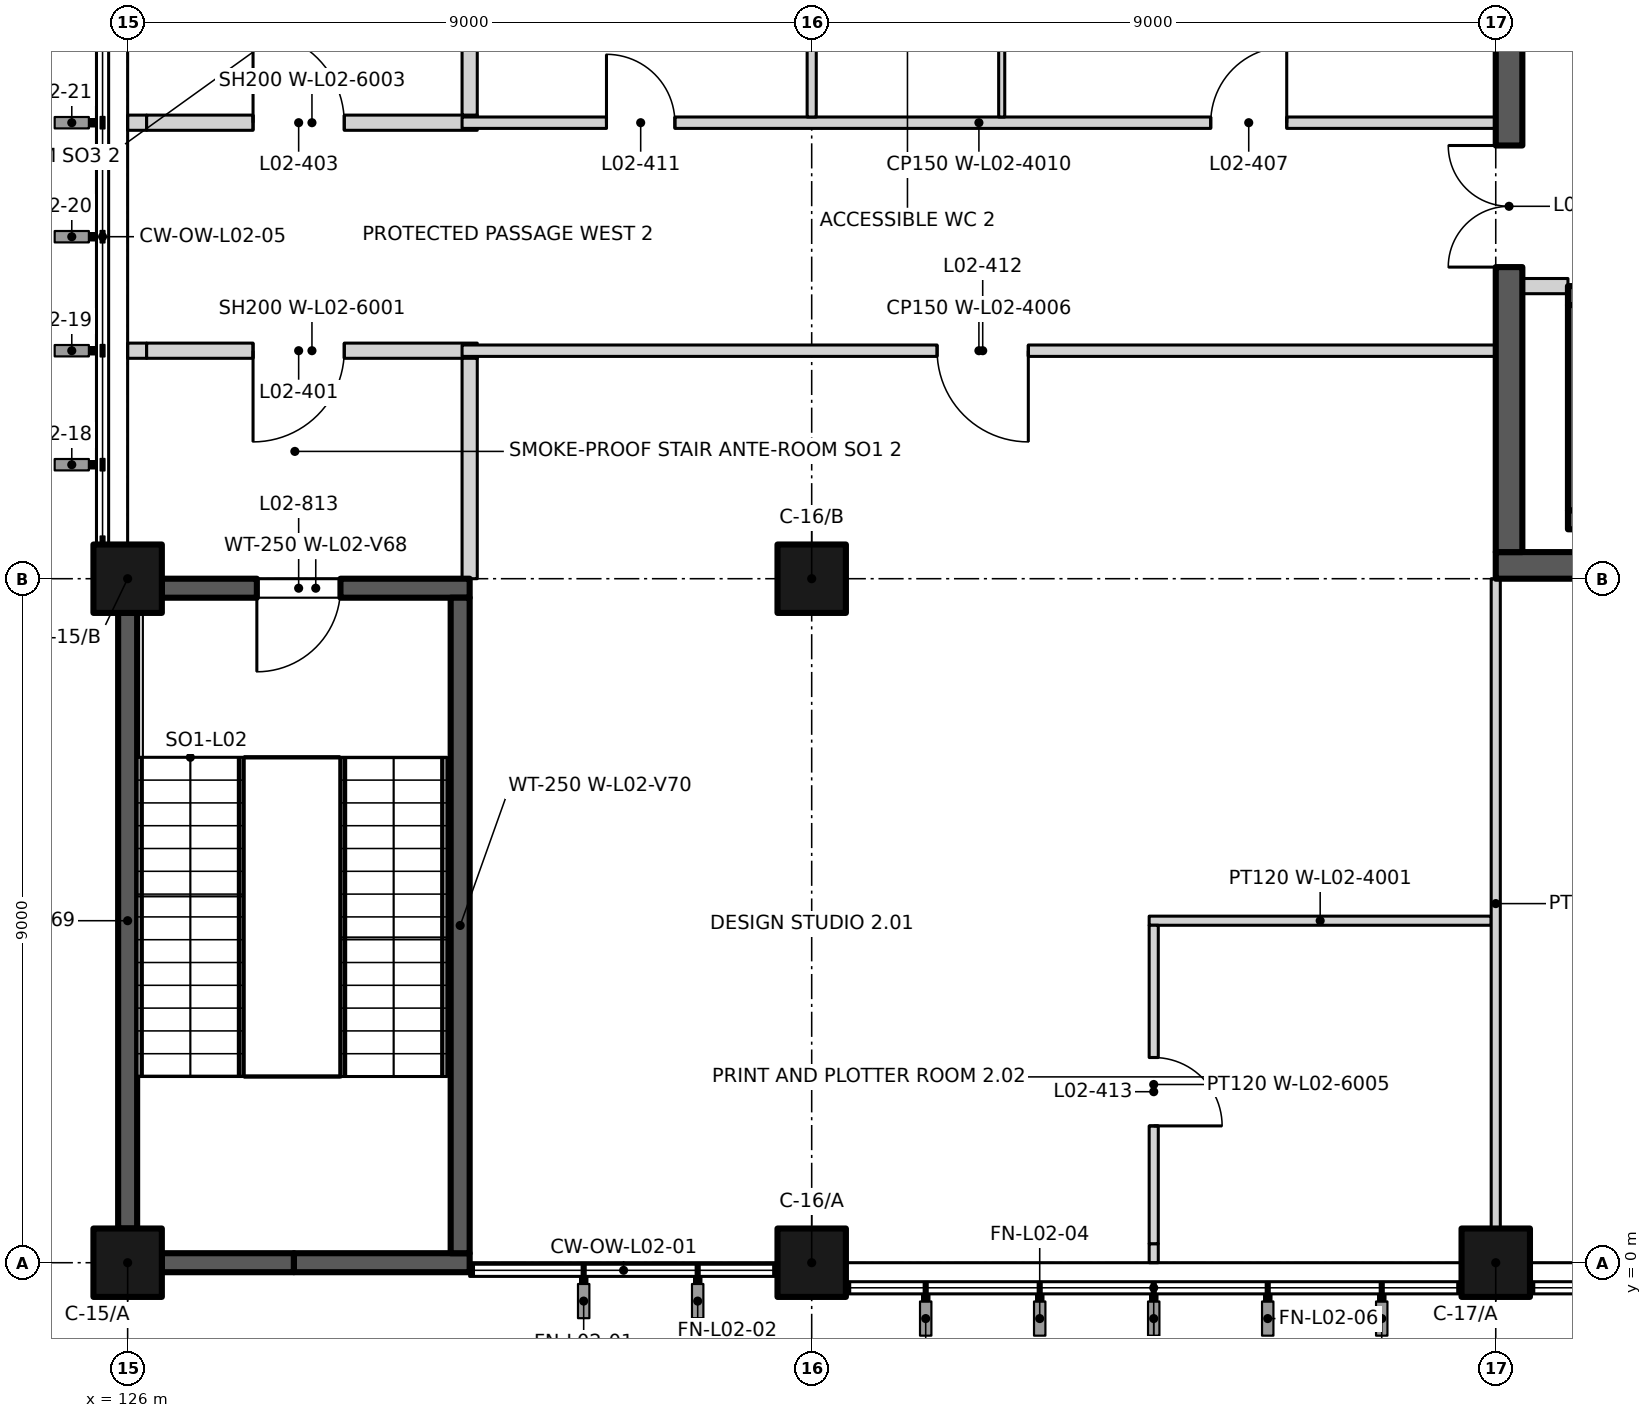
"""IFC4 building model, lengths in metres.
Left out: names, types, materials, properties, quantities, classifications, styles, units other than length and angle.
Written with IfcOpenShell. Run it as: python <this file> out.ifc"""

import sys

from ifc_helpers import new_model, si_unit, direction, frame, frame_2d, origin, origin_2d, place, context, subcontext, project, spatial, rectangle, extrude, element, fill, save


model = new_model("IFC4")
c1 = context("Model", 3, precision=1e-05, world=origin(), true_north=direction((0.0, 1.0)))
c2 = subcontext(c1, "Body", "Model", "MODEL_VIEW")
j1 = project(units=[si_unit("LENGTHUNIT", "METRE"), si_unit("PLANEANGLEUNIT", "RADIAN")], contexts=[c1])
p1 = place(None, origin())
s1 = spatial("IfcSite", under=j1, at=p1, CompositionType="ELEMENT")
p2 = place(p1, origin())
s2 = spatial("IfcBuilding", under=s1, at=p2, CompositionType="ELEMENT")
p3 = place(p2, frame((0.0, 0.0, 10.5)))
s3 = spatial("IfcBuildingStorey", under=s2, at=p3, CompositionType="ELEMENT", Elevation=10.5)
for number, where, z_axis, x_axis in (
    (1, (126.0, 0.0, 0.0), (0.0, 0.0, 1.0), (1.0, 0.0, 0.0)),
    (2, (135.0, 0.0, 0.0), (0.0, 0.0, 1.0), (1.0, 0.0, 0.0)),
    (3, (144.0, 0.0, 0.0), (0.0, 0.0, 1.0), (1.0, 0.0, 0.0)),
    (4, (126.0, 9.0, 0.0), (0.0, 0.0, 1.0), (1.0, 0.0, 0.0)),
    (5, (135.0, 9.0, 0.0), (0.0, 0.0, 1.0), (1.0, 0.0, 0.0)),
):
    element("IfcColumn", number, at=place(p3, frame(where, z_axis=z_axis, x_axis=x_axis)), inside=s3, PredefinedType="COLUMN", context=c2, shape_type="SweptSolid", body=[
        extrude(rectangle(XDim=0.9, YDim=0.9, at=origin_2d()), origin(), (0.0, 0.0, 1.0), 4.5),
    ])
p4 = place(p3, frame((126.45, 0.0, 0.0), z_axis=(0.0, 0.0, 1.0), x_axis=(1.0, 0.0, 0.0)))
e6 = element("IfcWall", 6, at=p4, inside=s3, PredefinedType="SHEAR", context=c2, shape_type="SweptSolid", body=[
    extrude(rectangle(XDim=1.738, YDim=0.25, at=frame_2d((0.869, 0.0))), origin(), (0.0, 0.0, 1.0), 4.5),
])
p5 = place(p3, frame((128.188, 0.0, 0.0), z_axis=(0.0, 0.0, 1.0), x_axis=(1.0, 0.0, 0.0)))
e7 = element("IfcWall", 7, at=p5, inside=s3, PredefinedType="SHEAR", context=c2, shape_type="SweptSolid", body=[
    extrude(rectangle(XDim=2.312, YDim=0.25, at=frame_2d((1.156, 0.0))), origin(), (0.0, 0.0, 1.0), 4.5),
])
p6 = place(p3, frame((126.45, 8.875, 0.0), z_axis=(0.0, 0.0, 1.0), x_axis=(1.0, 0.0, 0.0)))
e8 = element("IfcWall", 8, at=p6, inside=s3, PredefinedType="SHEAR", context=c2, shape_type="SweptSolid", body=[
    extrude(rectangle(XDim=4.05, YDim=0.25, at=frame_2d((2.025, 0.0))), origin(), (0.0, 0.0, 1.0), 4.5),
])
p7 = place(p6, frame((2.35, 0.0, 0.0), z_axis=(0.0, 0.0, 1.0), x_axis=(-1.0, 0.0, 0.0)))
e9 = element("IfcOpeningElement", 9, at=p7, cuts=e8, PredefinedType="OPENING", context=c2, shape_type="SweptSolid", body=[
    extrude(rectangle(XDim=1.1, YDim=2.1, at=frame_2d((0.55, 1.05))), frame((0.0, 0.135, 0.0), z_axis=(0.0, -1.0, 0.0), x_axis=(1.0, 0.0, 0.0)), (0.0, 0.0, 1.0), 0.27),
])
p8 = place(p3, frame((126.0, 0.45, 0.0), z_axis=(0.0, 0.0, 1.0), x_axis=(0.0, 1.0, 0.0)))
e10 = element("IfcWall", 10, at=p8, inside=s3, PredefinedType="SHEAR", context=c2, shape_type="SweptSolid", body=[
    extrude(rectangle(XDim=8.1, YDim=0.25, at=frame_2d((4.05, 0.0))), origin(), (0.0, 0.0, 1.0), 4.5),
])
p9 = place(p3, frame((130.375, 0.125, 0.0), z_axis=(0.0, 0.0, 1.0), x_axis=(0.0, 1.0, 0.0)))
e11 = element("IfcWall", 11, at=p9, inside=s3, PredefinedType="SHEAR", context=c2, shape_type="SweptSolid", body=[
    extrude(rectangle(XDim=8.625, YDim=0.25, at=frame_2d((4.312, 0.0))), origin(), (0.0, 0.0, 1.0), 4.5),
])
p10 = place(p3, frame((144.95, 12.725, 0.0), z_axis=(0.0, 0.0, 1.0), x_axis=(1.0, 0.0, 0.0)))
e12 = element("IfcWall", 12, at=p10, inside=s3, PredefinedType="SHEAR", context=c2, shape_type="SweptSolid", body=[
    extrude(rectangle(XDim=12.05, YDim=0.25, at=frame_2d((6.025, 0.0))), origin(), (0.0, 0.0, 1.0), 4.5),
])
p11 = place(p10, frame((1.05, 0.0, 0.0)))
e13 = element("IfcOpeningElement", 13, at=p11, cuts=e12, PredefinedType="OPENING", context=c2, shape_type="SweptSolid", body=[
    extrude(rectangle(XDim=1.1, YDim=2.1, at=frame_2d((0.55, 1.05))), frame((0.0, 0.135, 0.0), z_axis=(0.0, -1.0, 0.0), x_axis=(1.0, 0.0, 0.0)), (0.0, 0.0, 1.0), 0.27),
])
p12 = place(p10, frame((4.0, 0.0, 0.0)))
e14 = element("IfcOpeningElement", 14, at=p12, cuts=e12, PredefinedType="OPENING", context=c2, shape_type="SweptSolid", body=[
    extrude(rectangle(XDim=1.1, YDim=2.1, at=frame_2d((0.55, 1.05))), frame((0.0, 0.135, 0.0), z_axis=(0.0, -1.0, 0.0), x_axis=(1.0, 0.0, 0.0)), (0.0, 0.0, 1.0), 0.27),
])
p13 = place(p10, frame((6.95, 0.0, 0.0)))
e15 = element("IfcOpeningElement", 15, at=p13, cuts=e12, PredefinedType="OPENING", context=c2, shape_type="SweptSolid", body=[
    extrude(rectangle(XDim=1.1, YDim=2.1, at=frame_2d((0.55, 1.05))), frame((0.0, 0.135, 0.0), z_axis=(0.0, -1.0, 0.0), x_axis=(1.0, 0.0, 0.0)), (0.0, 0.0, 1.0), 0.27),
])
p14 = place(p10, frame((9.9, 0.0, 0.0)))
e16 = element("IfcOpeningElement", 16, at=p14, cuts=e12, PredefinedType="OPENING", context=c2, shape_type="SweptSolid", body=[
    extrude(rectangle(XDim=1.1, YDim=2.1, at=frame_2d((0.55, 1.05))), frame((0.0, 0.135, 0.0), z_axis=(0.0, -1.0, 0.0), x_axis=(1.0, 0.0, 0.0)), (0.0, 0.0, 1.0), 0.27),
])
p15 = place(p3, frame((144.95, 9.775, 0.0), z_axis=(0.0, 0.0, 1.0), x_axis=(1.0, 0.0, 0.0)))
e17 = element("IfcWall", 17, at=p15, inside=s3, PredefinedType="SHEAR", context=c2, shape_type="SweptSolid", body=[
    extrude(rectangle(XDim=12.05, YDim=0.25, at=frame_2d((6.025, 0.0))), origin(), (0.0, 0.0, 1.0), 4.5),
])
p16 = place(p3, frame((145.075, 9.9, 0.0), z_axis=(0.0, 0.0, 1.0), x_axis=(0.0, 1.0, 0.0)))
e18 = element("IfcWall", 18, at=p16, inside=s3, PredefinedType="SHEAR", context=c2, shape_type="SweptSolid", body=[
    extrude(rectangle(XDim=2.7, YDim=0.25, at=frame_2d((1.35, 0.0))), origin(), (0.0, 0.0, 1.0), 4.5),
])
p17 = place(p3, frame((139.44, 4.5, 0.0), z_axis=(0.0, 0.0, 1.0), x_axis=(1.0, 0.0, 0.0)))
e19 = element("IfcWall", 19, at=p17, inside=s3, PredefinedType="PARTITIONING", context=c2, shape_type="SweptSolid", body=[
    extrude(rectangle(XDim=4.5, YDim=0.12, at=frame_2d((2.25, 0.0))), origin(), (0.0, 0.0, 1.0), 4.2),
])
p18 = place(p3, frame((144.0, 9.175, 0.0), z_axis=(0.0, 0.0, 1.0), x_axis=(1.0, 0.0, 0.0)))
e20 = element("IfcWall", 20, at=p18, inside=s3, PredefinedType="SHEAR", context=c2, shape_type="SweptSolid", body=[
    extrude(rectangle(XDim=18.0, YDim=0.35, at=frame_2d((9.0, 0.0))), origin(), (0.0, 0.0, 1.0), 4.2),
])
p19 = place(p18, frame((16.463, 0.0, 0.0), z_axis=(0.0, 0.0, 1.0), x_axis=(-1.0, 0.0, 0.0)))
e21 = element("IfcOpeningElement", 21, at=p19, cuts=e20, PredefinedType="OPENING", context=c2, shape_type="SweptSolid", body=[
    extrude(rectangle(XDim=2.1, YDim=2.4, at=frame_2d((1.05, 1.2))), frame((0.0, 0.185, 0.0), z_axis=(0.0, -1.0, 0.0), x_axis=(1.0, 0.0, 0.0)), (0.0, 0.0, 1.0), 0.37),
])
p20 = place(p3, frame((126.0, 12.0, 0.0), z_axis=(0.0, 0.0, 1.0), x_axis=(1.0, 0.0, 0.0)))
e22 = element("IfcWall", 22, at=p20, inside=s3, PredefinedType="PARTITIONING", context=c2, shape_type="SweptSolid", body=[
    extrude(rectangle(XDim=0.25, YDim=0.2, at=frame_2d((0.125, 0.0))), origin(), (0.0, 0.0, 1.0), 3.6),
])
p21 = place(p3, frame((126.25, 12.0, 0.0), z_axis=(0.0, 0.0, 1.0), x_axis=(1.0, 0.0, 0.0)))
e23 = element("IfcWall", 23, at=p21, inside=s3, PredefinedType="PARTITIONING", context=c2, shape_type="SweptSolid", body=[
    extrude(rectangle(XDim=4.35, YDim=0.2, at=frame_2d((2.175, 0.0))), origin(), (0.0, 0.0, 1.0), 4.2),
])
p22 = place(p21, frame((2.6, 0.0, 0.0), z_axis=(0.0, 0.0, 1.0), x_axis=(-1.0, 0.0, 0.0)))
e24 = element("IfcOpeningElement", 24, at=p22, cuts=e23, PredefinedType="OPENING", context=c2, shape_type="SweptSolid", body=[
    extrude(rectangle(XDim=1.2, YDim=2.1, at=frame_2d((0.6, 1.05))), frame((0.0, 0.11, 0.0), z_axis=(0.0, -1.0, 0.0), x_axis=(1.0, 0.0, 0.0)), (0.0, 0.0, 1.0), 0.22),
])
p23 = place(p3, frame((130.4, 12.0, 0.0), z_axis=(0.0, 0.0, 1.0), x_axis=(1.0, 0.0, 0.0)))
e25 = element("IfcWall", 25, at=p23, inside=s3, PredefinedType="PARTITIONING", context=c2, shape_type="SweptSolid", body=[
    extrude(rectangle(XDim=13.6, YDim=0.15, at=frame_2d((6.8, 0.0))), origin(), (0.0, 0.0, 1.0), 4.2),
])
p24 = place(p23, frame((7.45, 0.0, 0.0), z_axis=(0.0, 0.0, 1.0), x_axis=(-1.0, 0.0, 0.0)))
e26 = element("IfcOpeningElement", 26, at=p24, cuts=e25, PredefinedType="OPENING", context=c2, shape_type="SweptSolid", body=[
    extrude(rectangle(XDim=1.2, YDim=2.1, at=frame_2d((0.6, 1.05))), frame((0.0, 0.085, 0.0), z_axis=(0.0, -1.0, 0.0), x_axis=(1.0, 0.0, 0.0)), (0.0, 0.0, 1.0), 0.17),
])
p25 = place(p3, frame((144.35, 12.85, 0.0), z_axis=(0.0, 0.0, 1.0), x_axis=(1.0, 0.0, 0.0)))
e27 = element("IfcWall", 27, at=p25, inside=s3, PredefinedType="PARTITIONING", context=c2, shape_type="SweptSolid", body=[
    extrude(rectangle(XDim=0.6, YDim=0.2, at=frame_2d((0.3, 0.0))), origin(), (0.0, 0.0, 1.0), 4.2),
])
p26 = place(p3, frame((126.0, 15.0, 0.0), z_axis=(0.0, 0.0, 1.0), x_axis=(1.0, 0.0, 0.0)))
e28 = element("IfcWall", 28, at=p26, inside=s3, PredefinedType="PARTITIONING", context=c2, shape_type="SweptSolid", body=[
    extrude(rectangle(XDim=0.25, YDim=0.2, at=frame_2d((0.125, 0.0))), origin(), (0.0, 0.0, 1.0), 3.6),
])
p27 = place(p3, frame((126.25, 15.0, 0.0), z_axis=(0.0, 0.0, 1.0), x_axis=(1.0, 0.0, 0.0)))
e29 = element("IfcWall", 29, at=p27, inside=s3, PredefinedType="PARTITIONING", context=c2, shape_type="SweptSolid", body=[
    extrude(rectangle(XDim=4.35, YDim=0.2, at=frame_2d((2.175, 0.0))), origin(), (0.0, 0.0, 1.0), 4.2),
])
p28 = place(p27, frame((1.4, 0.0, 0.0)))
e30 = element("IfcOpeningElement", 30, at=p28, cuts=e29, PredefinedType="OPENING", context=c2, shape_type="SweptSolid", body=[
    extrude(rectangle(XDim=1.2, YDim=2.1, at=frame_2d((0.6, 1.05))), frame((0.0, 0.11, 0.0), z_axis=(0.0, -1.0, 0.0), x_axis=(1.0, 0.0, 0.0)), (0.0, 0.0, 1.0), 0.22),
])
p29 = place(p3, frame((130.4, 15.0, 0.0), z_axis=(0.0, 0.0, 1.0), x_axis=(1.0, 0.0, 0.0)))
e31 = element("IfcWall", 31, at=p29, inside=s3, PredefinedType="PARTITIONING", context=c2, shape_type="SweptSolid", body=[
    extrude(rectangle(XDim=13.6, YDim=0.15, at=frame_2d((6.8, 0.0))), origin(), (0.0, 0.0, 1.0), 4.2),
])
p30 = place(p29, frame((9.85, 0.0, 0.0)))
e32 = element("IfcOpeningElement", 32, at=p30, cuts=e31, PredefinedType="OPENING", context=c2, shape_type="SweptSolid", body=[
    extrude(rectangle(XDim=1.0, YDim=2.1, at=frame_2d((0.5, 1.05))), frame((0.0, 0.085, 0.0), z_axis=(0.0, -1.0, 0.0), x_axis=(1.0, 0.0, 0.0)), (0.0, 0.0, 1.0), 0.17),
])
p31 = place(p29, frame((1.9, 0.0, 0.0)))
e33 = element("IfcOpeningElement", 33, at=p31, cuts=e31, PredefinedType="OPENING", context=c2, shape_type="SweptSolid", body=[
    extrude(rectangle(XDim=0.9, YDim=2.1, at=frame_2d((0.45, 1.05))), frame((0.0, 0.085, 0.0), z_axis=(0.0, -1.0, 0.0), x_axis=(1.0, 0.0, 0.0)), (0.0, 0.0, 1.0), 0.17),
])
for number, where, z_axis, x_axis in (
    (34, (130.5, 9.0, 0.0), (0.0, 0.0, 1.0), (0.0, 1.0, 0.0)),
    (35, (130.5, 15.1, 0.0), (0.0, 0.0, 1.0), (0.0, 1.0, 0.0)),
):
    element("IfcWall", number, at=place(p3, frame(where, z_axis=z_axis, x_axis=x_axis)), inside=s3, PredefinedType="PARTITIONING", context=c2, shape_type="SweptSolid", body=[
        extrude(rectangle(XDim=2.9, YDim=0.2, at=frame_2d((1.45, 0.0))), origin(), (0.0, 0.0, 1.0), 4.2),
    ])
p32 = place(p3, frame((135.0, 15.075, 0.0), z_axis=(0.0, 0.0, 1.0), x_axis=(0.0, 1.0, 0.0)))
e36 = element("IfcWall", 36, at=p32, inside=s3, PredefinedType="PARTITIONING", context=c2, shape_type="SweptSolid", body=[
    extrude(rectangle(XDim=2.475, YDim=0.12, at=frame_2d((1.238, 0.0))), origin(), (0.0, 0.0, 1.0), 4.2),
])
p33 = place(p3, frame((137.5, 15.075, 0.0), z_axis=(0.0, 0.0, 1.0), x_axis=(0.0, 1.0, 0.0)))
e37 = element("IfcWall", 37, at=p33, inside=s3, PredefinedType="PARTITIONING", context=c2, shape_type="SweptSolid", body=[
    extrude(rectangle(XDim=4.385, YDim=0.08, at=frame_2d((2.192, 0.0))), origin(), (0.0, 0.0, 1.0), 4.2),
])
p34 = place(p33, frame((1.675, 0.0, 0.0)))
e38 = element("IfcOpeningElement", 38, at=p34, cuts=e37, PredefinedType="OPENING", context=c2, shape_type="SweptSolid", body=[
    extrude(rectangle(XDim=1.0, YDim=2.1, at=frame_2d((0.5, 1.05))), frame((0.0, 0.05, 0.0), z_axis=(0.0, -1.0, 0.0), x_axis=(1.0, 0.0, 0.0)), (0.0, 0.0, 1.0), 0.1),
])
p35 = place(p3, frame((139.5, 0.0, 0.0), z_axis=(0.0, 0.0, 1.0), x_axis=(0.0, 1.0, 0.0)))
e39 = element("IfcWall", 39, at=p35, inside=s3, PredefinedType="PARTITIONING", context=c2, shape_type="SweptSolid", body=[
    extrude(rectangle(XDim=0.25, YDim=0.12, at=frame_2d((0.125, 0.0))), origin(), (0.0, 0.0, 1.0), 3.6),
])
p36 = place(p3, frame((139.5, 0.25, 0.0), z_axis=(0.0, 0.0, 1.0), x_axis=(0.0, 1.0, 0.0)))
e40 = element("IfcWall", 40, at=p36, inside=s3, PredefinedType="PARTITIONING", context=c2, shape_type="SweptSolid", body=[
    extrude(rectangle(XDim=4.19, YDim=0.12, at=frame_2d((2.095, 0.0))), origin(), (0.0, 0.0, 1.0), 4.2),
])
p37 = place(p36, frame((2.45, 0.0, 0.0), z_axis=(0.0, 0.0, 1.0), x_axis=(-1.0, 0.0, 0.0)))
e41 = element("IfcOpeningElement", 41, at=p37, cuts=e40, PredefinedType="OPENING", context=c2, shape_type="SweptSolid", body=[
    extrude(rectangle(XDim=0.9, YDim=2.1, at=frame_2d((0.45, 1.05))), frame((0.0, 0.07, 0.0), z_axis=(0.0, -1.0, 0.0), x_axis=(1.0, 0.0, 0.0)), (0.0, 0.0, 1.0), 0.14),
])
p38 = place(p3, frame((144.0, 0.45, 0.0), z_axis=(0.0, 0.0, 1.0), x_axis=(0.0, 1.0, 0.0)))
e42 = element("IfcWall", 42, at=p38, inside=s3, PredefinedType="PARTITIONING", context=c2, shape_type="SweptSolid", body=[
    extrude(rectangle(XDim=8.55, YDim=0.12, at=frame_2d((4.275, 0.0))), origin(), (0.0, 0.0, 1.0), 4.2),
])
p39 = place(p3, frame((144.175, 9.35, 0.0), z_axis=(0.0, 0.0, 1.0), x_axis=(0.0, 1.0, 0.0)))
e43 = element("IfcWall", 43, at=p39, inside=s3, PredefinedType="SHEAR", context=c2, shape_type="SweptSolid", body=[
    extrude(rectangle(XDim=17.4, YDim=0.35, at=frame_2d((8.7, 0.0))), origin(), (0.0, 0.0, 1.0), 4.2),
])
p40 = place(p39, frame((3.75, 0.0, 0.0)))
e44 = element("IfcOpeningElement", 44, at=p40, cuts=e43, PredefinedType="OPENING", context=c2, shape_type="SweptSolid", body=[
    extrude(rectangle(XDim=1.6, YDim=2.4, at=frame_2d((0.8, 1.2))), frame((0.0, 0.185, 0.0), z_axis=(0.0, -1.0, 0.0), x_axis=(1.0, 0.0, 0.0)), (0.0, 0.0, 1.0), 0.37),
])
p41 = place(p7, origin())
e45 = element("IfcDoor", 45, at=p41, inside=s3, OperationType="SINGLE_SWING_RIGHT", PredefinedType="DOOR", context=c2, shape_type="SweptSolid", body=[
    extrude(rectangle(XDim=1.1, YDim=2.1, at=frame_2d((0.55, 1.05))), frame((0.0, 0.025, 0.0), z_axis=(0.0, -1.0, 0.0), x_axis=(1.0, 0.0, 0.0)), (0.0, 0.0, 1.0), 0.05),
])
fill(e9, e45)
p42 = place(p22, origin())
e46 = element("IfcDoor", 46, at=p42, inside=s3, OperationType="SINGLE_SWING_RIGHT", PredefinedType="DOOR", context=c2, shape_type="SweptSolid", body=[
    extrude(rectangle(XDim=1.2, YDim=2.1, at=frame_2d((0.6, 1.05))), frame((0.0, 0.025, 0.0), z_axis=(0.0, -1.0, 0.0), x_axis=(1.0, 0.0, 0.0)), (0.0, 0.0, 1.0), 0.05),
])
fill(e24, e46)
p43 = place(p28, origin())
e47 = element("IfcDoor", 47, at=p43, inside=s3, OperationType="SINGLE_SWING_LEFT", PredefinedType="DOOR", context=c2, shape_type="SweptSolid", body=[
    extrude(rectangle(XDim=1.2, YDim=2.1, at=frame_2d((0.6, 1.05))), frame((0.0, 0.025, 0.0), z_axis=(0.0, -1.0, 0.0), x_axis=(1.0, 0.0, 0.0)), (0.0, 0.0, 1.0), 0.05),
])
fill(e30, e47)
p44 = place(p40, origin())
e48 = element("IfcDoor", 48, at=p44, inside=s3, OperationType="DOUBLE_DOOR_SINGLE_SWING", PredefinedType="DOOR", context=c2, shape_type="SweptSolid", body=[
    extrude(rectangle(XDim=1.6, YDim=2.4, at=frame_2d((0.8, 1.2))), frame((0.0, 0.025, 0.0), z_axis=(0.0, -1.0, 0.0), x_axis=(1.0, 0.0, 0.0)), (0.0, 0.0, 1.0), 0.05),
])
fill(e44, e48)
p45 = place(p30, origin())
e49 = element("IfcDoor", 49, at=p45, inside=s3, OperationType="SINGLE_SWING_RIGHT", PredefinedType="DOOR", context=c2, shape_type="SweptSolid", body=[
    extrude(rectangle(XDim=1.0, YDim=2.1, at=frame_2d((0.5, 1.05))), frame((0.0, 0.025, 0.0), z_axis=(0.0, -1.0, 0.0), x_axis=(1.0, 0.0, 0.0)), (0.0, 0.0, 1.0), 0.05),
])
fill(e32, e49)
p46 = place(p31, origin())
e50 = element("IfcDoor", 50, at=p46, inside=s3, OperationType="SINGLE_SWING_LEFT", PredefinedType="DOOR", context=c2, shape_type="SweptSolid", body=[
    extrude(rectangle(XDim=0.9, YDim=2.1, at=frame_2d((0.45, 1.05))), frame((0.0, 0.025, 0.0), z_axis=(0.0, -1.0, 0.0), x_axis=(1.0, 0.0, 0.0)), (0.0, 0.0, 1.0), 0.05),
])
fill(e33, e50)
p47 = place(p24, origin())
e51 = element("IfcDoor", 51, at=p47, inside=s3, OperationType="SINGLE_SWING_LEFT", PredefinedType="DOOR", context=c2, shape_type="SweptSolid", body=[
    extrude(rectangle(XDim=1.2, YDim=2.1, at=frame_2d((0.6, 1.05))), frame((0.0, 0.025, 0.0), z_axis=(0.0, -1.0, 0.0), x_axis=(1.0, 0.0, 0.0)), (0.0, 0.0, 1.0), 0.05),
])
fill(e26, e51)
p48 = place(p37, origin())
e52 = element("IfcDoor", 52, at=p48, inside=s3, OperationType="SINGLE_SWING_RIGHT", PredefinedType="DOOR", context=c2, shape_type="SweptSolid", body=[
    extrude(rectangle(XDim=0.9, YDim=2.1, at=frame_2d((0.45, 1.05))), frame((0.0, 0.025, 0.0), z_axis=(0.0, -1.0, 0.0), x_axis=(1.0, 0.0, 0.0)), (0.0, 0.0, 1.0), 0.05),
])
fill(e41, e52)
save(model, sys.argv[1])
